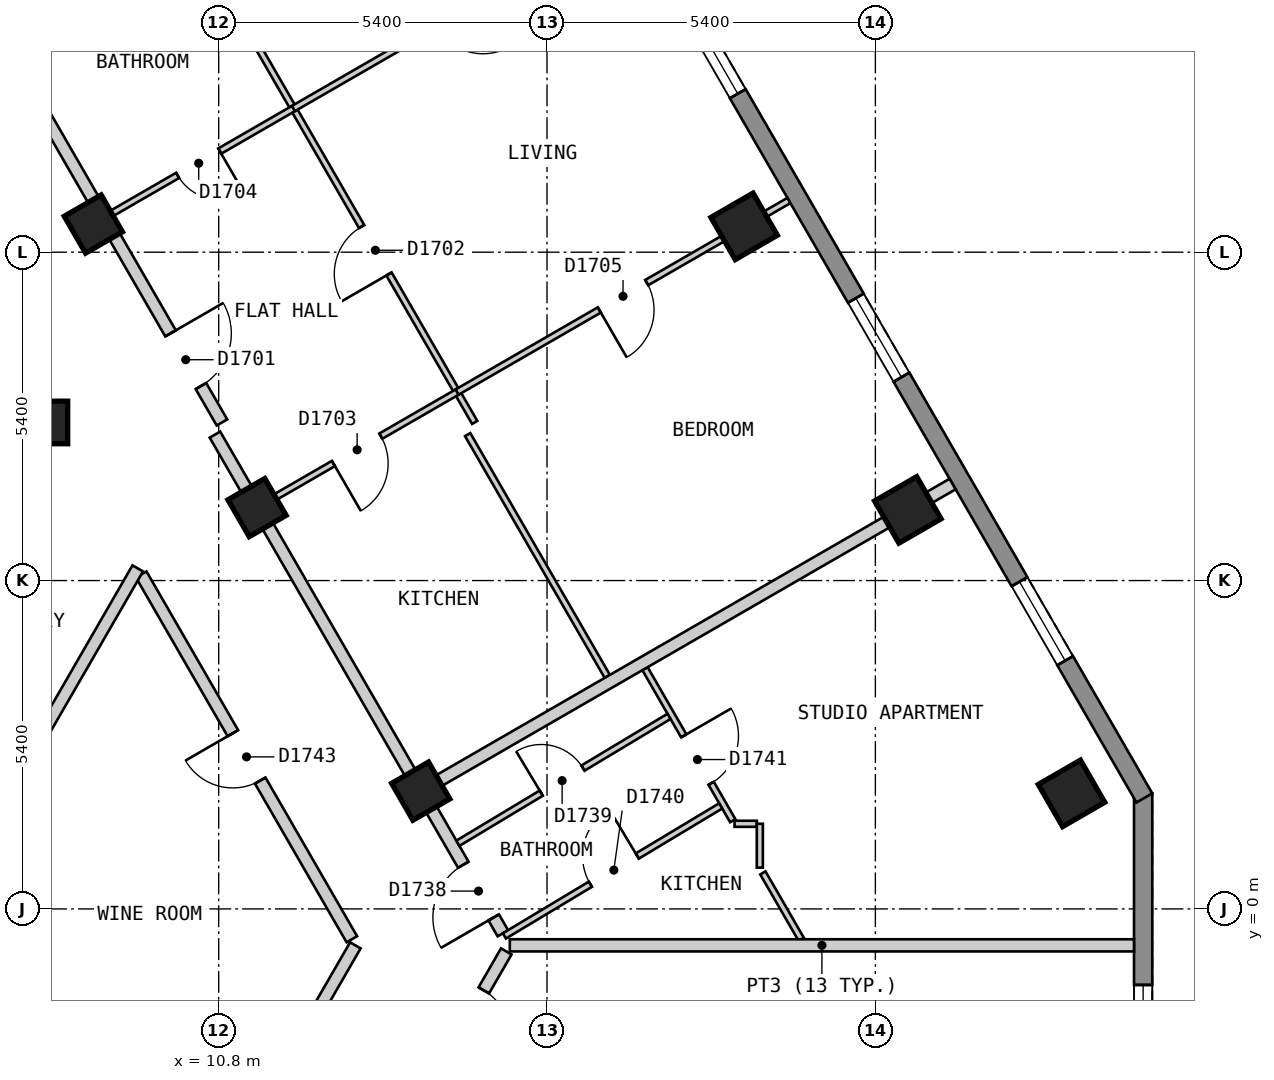
"""IFC4 building model, lengths in metres.
Left out: names, types, materials, properties, quantities, classifications, styles, units other than length and angle.
Written with IfcOpenShell. Run it as: python <this file> out.ifc"""

import sys

from ifc_helpers import new_model, si_unit, direction, frame, frame_2d, origin, origin_2d, place, context, subcontext, project, spatial, polyline, rectangle, outline, extrude, element, fill, save


model = new_model("IFC4")
c1 = context("Model", 3, precision=1e-05, world=origin(), true_north=direction((0.0, 1.0)))
c2 = subcontext(c1, "Body", "Model", "MODEL_VIEW")
j1 = project(units=[si_unit("LENGTHUNIT", "METRE"), si_unit("PLANEANGLEUNIT", "RADIAN")], contexts=[c1])
p1 = place(None, origin())
s1 = spatial("IfcSite", under=j1, at=p1, CompositionType="ELEMENT")
p2 = place(p1, origin())
s2 = spatial("IfcBuilding", under=s1, at=p2, CompositionType="ELEMENT")
p3 = place(p2, frame((0.0, 0.0, 181.2)))
s3 = spatial("IfcBuildingStorey", under=s2, at=p3, CompositionType="ELEMENT", Elevation=181.2)
for number, where, z_axis, x_axis in (
    (1, (24.826, 1.9, 0.0), (0.0, 0.0, 1.0), (-0.5, 0.866, 0.0)),
    (2, (22.134, 6.562, 0.0), (0.0, 0.0, 1.0), (-0.5, 0.866, 0.0)),
    (3, (19.442, 11.225, 0.0), (0.0, 0.0, 1.0), (-0.5, 0.866, 0.0)),
):
    element("IfcColumn", number, at=place(p3, frame(where, z_axis=z_axis, x_axis=x_axis)), inside=s3, PredefinedType="COLUMN", context=c2, shape_type="SweptSolid", body=[
        extrude(rectangle(XDim=0.8, YDim=0.8, at=origin_2d()), origin(), (0.0, 0.0, 1.0), 3.0),
    ])
for number, where, z_axis, x_axis in (
    (4, (14.123, 1.937, 0.0), (0.0, 0.0, 1.0), (-0.5, 0.866, 0.0)),
    (5, (11.431, 6.6, 0.0), (0.0, 0.0, 1.0), (-0.5, 0.866, 0.0)),
    (6, (7.967, 8.0, 0.0), (0.0, 0.0, 1.0), (1.0, 0.0, 0.0)),
    (7, (8.739, 11.263, 0.0), (0.0, 0.0, 1.0), (-0.5, 0.866, 0.0)),
):
    element("IfcColumn", number, at=place(p3, frame(where, z_axis=z_axis, x_axis=x_axis)), inside=s3, PredefinedType="COLUMN", context=c2, shape_type="SweptSolid", body=[
        extrude(rectangle(XDim=0.7, YDim=0.7, at=origin_2d()), origin(), (0.0, 0.0, 1.0), 3.0),
    ])
p4 = place(p3, frame((26.004, -3.1, 0.0), z_axis=(0.0, 0.0, 1.0), x_axis=(0.0, 1.0, 0.0)))
e8 = element("IfcWall", 8, at=p4, inside=s3, PredefinedType="SOLIDWALL", context=c2, shape_type="SweptSolid", body=[
    extrude(outline(polyline([(0.0, -0.15), (5.0, -0.15), (4.92, 0.15), (0.08, 0.15), (0.0, -0.15)])), origin(), (0.0, 0.0, 1.0), 2.7),
])
p5 = place(p4, frame((0.65, 0.0, 0.15)))
e9 = element("IfcOpeningElement", 9, at=p5, cuts=e8, PredefinedType="OPENING", context=c2, shape_type="SweptSolid", body=[
    extrude(rectangle(XDim=1.2, YDim=2.1, at=frame_2d((0.6, 1.05))), frame((0.0, 0.16, 0.0), z_axis=(0.0, -1.0, 0.0), x_axis=(1.0, 0.0, 0.0)), (0.0, 0.0, 1.0), 0.32),
])
p6 = place(p3, frame((26.024, 1.825, 0.0), z_axis=(0.0, 0.0, 1.0), x_axis=(-0.500010537973, 0.866019319597, 0.0)))
e10 = element("IfcWall", 10, at=p6, inside=s3, PredefinedType="SOLIDWALL", context=c2, shape_type="SweptSolid", body=[
    extrude(outline(polyline([(0.0, -0.15), (22.863, -0.15), (22.783, 0.15), (0.08, 0.15), (0.0, -0.15)])), origin(), (0.0, 0.0, 1.0), 2.7),
])
p7 = place(p6, frame((2.606, 0.0, 0.15)))
e11 = element("IfcOpeningElement", 11, at=p7, cuts=e10, PredefinedType="OPENING", context=c2, shape_type="SweptSolid", body=[
    extrude(rectangle(XDim=1.5, YDim=2.1, at=frame_2d((0.75, 1.05))), frame((0.0, 0.16, 0.0), z_axis=(0.0, -1.0, 0.0), x_axis=(1.0, 0.0, 0.0)), (0.0, 0.0, 1.0), 0.32),
])
p8 = place(p6, frame((7.99, 0.0, 0.15)))
e12 = element("IfcOpeningElement", 12, at=p8, cuts=e10, PredefinedType="OPENING", context=c2, shape_type="SweptSolid", body=[
    extrude(rectangle(XDim=1.5, YDim=2.1, at=frame_2d((0.75, 1.05))), frame((0.0, 0.16, 0.0), z_axis=(0.0, -1.0, 0.0), x_axis=(1.0, 0.0, 0.0)), (0.0, 0.0, 1.0), 0.32),
])
p9 = place(p6, frame((13.373, 0.0, 0.15)))
e13 = element("IfcOpeningElement", 13, at=p9, cuts=e10, PredefinedType="OPENING", context=c2, shape_type="SweptSolid", body=[
    extrude(rectangle(XDim=1.5, YDim=2.1, at=frame_2d((0.75, 1.05))), frame((0.0, 0.16, 0.0), z_axis=(0.0, -1.0, 0.0), x_axis=(1.0, 0.0, 0.0)), (0.0, 0.0, 1.0), 0.32),
])
p10 = place(p6, frame((18.758, 0.0, 0.15)))
e14 = element("IfcOpeningElement", 14, at=p10, cuts=e10, PredefinedType="OPENING", context=c2, shape_type="SweptSolid", body=[
    extrude(rectangle(XDim=1.5, YDim=2.1, at=frame_2d((0.75, 1.05))), frame((0.0, 0.16, 0.0), z_axis=(0.0, -1.0, 0.0), x_axis=(1.0, 0.0, 0.0)), (0.0, 0.0, 1.0), 0.32),
])
p11 = place(p3, frame((9.526, 5.5, 0.0), z_axis=(0.0, 0.0, 1.0), x_axis=(0.500062092869, -0.865989551482, 0.0)))
e15 = element("IfcWall", 15, at=p11, inside=s3, PredefinedType="PARTITIONING", context=c2, shape_type="SweptSolid", body=[
    extrude(rectangle(XDim=6.927, YDim=0.2, at=frame_2d((3.464, 0.0))), origin(), (0.0, 0.0, 1.0), 2.7),
])
p12 = place(p11, frame((3.014, 0.0, 0.0)))
e16 = element("IfcOpeningElement", 16, at=p12, cuts=e15, PredefinedType="OPENING", context=c2, shape_type="SweptSolid", body=[
    extrude(rectangle(XDim=0.9, YDim=2.1, at=frame_2d((0.45, 1.05))), frame((0.0, 0.11, 0.0), z_axis=(0.0, -1.0, 0.0), x_axis=(1.0, 0.0, 0.0)), (0.0, 0.0, 1.0), 0.22),
])
p13 = place(p3, frame((10.739, 7.8, 0.0), z_axis=(0.0, 0.0, 1.0), x_axis=(0.500023726918, -0.866011704609, 0.0)))
e17 = element("IfcWall", 17, at=p13, inside=s3, PredefinedType="PARTITIONING", context=c2, shape_type="SweptSolid", body=[
    extrude(rectangle(XDim=9.47, YDim=0.2, at=frame_2d((4.735, 0.0))), origin(), (0.0, 0.0, 1.0), 2.7),
])
p14 = place(p13, frame((8.168, 0.0, 0.0)))
e18 = element("IfcOpeningElement", 18, at=p14, cuts=e17, PredefinedType="OPENING", context=c2, shape_type="SweptSolid", body=[
    extrude(rectangle(XDim=1.0, YDim=2.1, at=frame_2d((0.5, 1.05))), frame((0.0, 0.11, 0.0), z_axis=(0.0, -1.0, 0.0), x_axis=(1.0, 0.0, 0.0)), (0.0, 0.0, 1.0), 0.22),
])
p15 = place(p3, frame((5.485, 17.3, 0.0), z_axis=(0.0, 0.0, 1.0), x_axis=(0.499965832213, -0.866045129667, 0.0)))
e19 = element("IfcWall", 19, at=p15, inside=s3, PredefinedType="PARTITIONING", context=c2, shape_type="SweptSolid", body=[
    extrude(rectangle(XDim=10.739, YDim=0.2, at=frame_2d((5.369, 0.0))), origin(), (0.0, 0.0, 1.0), 2.7),
])
p16 = place(p15, frame((9.047, 0.0, 0.0)))
e20 = element("IfcOpeningElement", 20, at=p16, cuts=e19, PredefinedType="OPENING", context=c2, shape_type="SweptSolid", body=[
    extrude(rectangle(XDim=1.0, YDim=2.1, at=frame_2d((0.5, 1.05))), frame((0.0, 0.11, 0.0), z_axis=(0.0, -1.0, 0.0), x_axis=(1.0, 0.0, 0.0)), (0.0, 0.0, 1.0), 0.22),
])
p17 = place(p3, frame((7.028, 1.373, 0.0), z_axis=(0.0, 0.0, 1.0), x_axis=(0.500065924398, 0.86598733897, 0.0)))
e21 = element("IfcWall", 21, at=p17, inside=s3, PredefinedType="PARTITIONING", context=c2, shape_type="SweptSolid", body=[
    extrude(rectangle(XDim=4.881, YDim=0.2, at=frame_2d((2.44, 0.0))), origin(), (0.0, 0.0, 1.0), 2.7),
])
p18 = place(p3, frame((11.777, -2.8, 0.0), z_axis=(0.0, 0.0, 1.0), x_axis=(0.500085537782, 0.86597601289, 0.0)))
e22 = element("IfcWall", 22, at=p18, inside=s3, PredefinedType="PARTITIONING", context=c2, shape_type="SweptSolid", body=[
    extrude(rectangle(XDim=2.542, YDim=0.2, at=frame_2d((1.271, 0.0))), origin(), (0.0, 0.0, 1.0), 2.7),
])
p19 = place(p3, frame((14.318, -2.8, 0.0), z_axis=(0.0, 0.0, 1.0), x_axis=(0.49964693309, 0.866229151122, 0.0)))
e23 = element("IfcWall", 23, at=p19, inside=s3, PredefinedType="PARTITIONING", context=c2, shape_type="SweptSolid", body=[
    extrude(rectangle(XDim=2.426, YDim=0.2, at=frame_2d((1.213, 0.0))), origin(), (0.0, 0.0, 1.0), 2.7),
])
p20 = place(p19, frame((0.886, 0.0, 0.0)))
e24 = element("IfcOpeningElement", 24, at=p20, cuts=e23, PredefinedType="OPENING", context=c2, shape_type="SweptSolid", body=[
    extrude(rectangle(XDim=0.8, YDim=2.1, at=frame_2d((0.4, 1.05))), frame((0.0, 0.11, 0.0), z_axis=(0.0, -1.0, 0.0), x_axis=(1.0, 0.0, 0.0)), (0.0, 0.0, 1.0), 0.22),
])
p21 = place(p3, frame((14.895, 7.8, 0.0), z_axis=(0.0, 0.0, 1.0), x_axis=(0.500050787847, -0.865996079421, 0.0)))
e25 = element("IfcWall", 25, at=p21, inside=s3, PredefinedType="PARTITIONING", context=c2, shape_type="SweptSolid", body=[
    extrude(rectangle(XDim=4.591, YDim=0.1, at=frame_2d((2.296, 0.0))), origin(), (0.0, 0.0, 1.0), 2.7),
])
p22 = place(p3, frame((9.526, 17.5, 0.0), z_axis=(0.0, 0.0, 1.0), x_axis=(0.500019134094, -0.866014356428, 0.0)))
e26 = element("IfcWall", 26, at=p22, inside=s3, PredefinedType="PARTITIONING", context=c2, shape_type="SweptSolid", body=[
    extrude(rectangle(XDim=10.97, YDim=0.1, at=frame_2d((5.485, 0.0))), origin(), (0.0, 0.0, 1.0), 2.7),
])
p23 = place(p22, frame((7.25, 0.0, 0.0)))
e27 = element("IfcOpeningElement", 27, at=p23, cuts=e26, PredefinedType="OPENING", context=c2, shape_type="SweptSolid", body=[
    extrude(rectangle(XDim=0.9, YDim=2.1, at=frame_2d((0.45, 1.05))), frame((0.0, 0.06, 0.0), z_axis=(0.0, -1.0, 0.0), x_axis=(1.0, 0.0, 0.0)), (0.0, 0.0, 1.0), 0.12),
])
p24 = place(p3, frame((17.811, 3.951, 0.0), z_axis=(0.0, 0.0, 1.0), x_axis=(0.499976149225, -0.866039173598, 0.0)))
e28 = element("IfcWall", 28, at=p24, inside=s3, PredefinedType="PARTITIONING", context=c2, shape_type="SweptSolid", body=[
    extrude(rectangle(XDim=2.888, YDim=0.1, at=frame_2d((1.444, 0.0))), origin(), (0.0, 0.0, 1.0), 2.7),
])
p25 = place(p24, frame((1.276, 0.0, 0.0)))
e29 = element("IfcOpeningElement", 29, at=p25, cuts=e28, PredefinedType="OPENING", context=c2, shape_type="SweptSolid", body=[
    extrude(rectangle(XDim=0.9, YDim=2.1, at=frame_2d((0.45, 1.05))), frame((0.0, 0.06, 0.0), z_axis=(0.0, -1.0, 0.0), x_axis=(1.0, 0.0, 0.0)), (0.0, 0.0, 1.0), 0.12),
])
p26 = place(p3, frame((19.75, 0.592, 0.0), z_axis=(0.0, 0.0, 1.0), x_axis=(0.499974077718, -0.866040369504, 0.0)))
e30 = element("IfcWall", 30, at=p26, inside=s3, PredefinedType="PARTITIONING", context=c2, shape_type="SweptSolid", body=[
    extrude(rectangle(XDim=1.26, YDim=0.1, at=frame_2d((0.63, 0.0))), origin(), (0.0, 0.0, 1.0), 2.7),
])
p27 = place(p3, frame((19.284, 1.4, 0.0), z_axis=(0.0, 0.0, 1.0), x_axis=(1.0, 0.0, 0.0)))
e31 = element("IfcWall", 31, at=p27, inside=s3, PredefinedType="PARTITIONING", context=c2, shape_type="SweptSolid", body=[
    extrude(rectangle(XDim=0.366, YDim=0.1, at=frame_2d((0.183, 0.0))), origin(), (0.0, 0.0, 1.0), 2.7),
])
p28 = place(p3, frame((19.7, 0.679, 0.0), z_axis=(0.0, 0.0, 1.0), x_axis=(0.0, 1.0, 0.0)))
e32 = element("IfcWall", 32, at=p28, inside=s3, PredefinedType="PARTITIONING", context=c2, shape_type="SweptSolid", body=[
    extrude(rectangle(XDim=0.721, YDim=0.1, at=frame_2d((0.36, 0.0))), origin(), (0.0, 0.0, 1.0), 2.7),
])
p29 = place(p3, frame((11.518, 6.65, 0.0), z_axis=(0.0, 0.0, 1.0), x_axis=(0.865984470368, 0.500070892056, 0.0)))
e33 = element("IfcWall", 33, at=p29, inside=s3, PredefinedType="PARTITIONING", context=c2, shape_type="SweptSolid", body=[
    extrude(rectangle(XDim=3.7, YDim=0.1, at=frame_2d((1.85, 0.0))), origin(), (0.0, 0.0, 1.0), 2.7),
])
p30 = place(p29, frame((1.35, 0.0, 0.0)))
e34 = element("IfcOpeningElement", 34, at=p30, cuts=e33, PredefinedType="OPENING", context=c2, shape_type="SweptSolid", body=[
    extrude(rectangle(XDim=0.9, YDim=2.1, at=frame_2d((0.45, 1.05))), frame((0.0, 0.06, 0.0), z_axis=(0.0, -1.0, 0.0), x_axis=(1.0, 0.0, 0.0)), (0.0, 0.0, 1.0), 0.12),
])
p31 = place(p3, frame((8.999, 11.413, 0.0), z_axis=(0.0, 0.0, 1.0), x_axis=(0.866019471182, 0.500010275428, 0.0)))
e35 = element("IfcWall", 35, at=p31, inside=s3, PredefinedType="PARTITIONING", context=c2, shape_type="SweptSolid", body=[
    extrude(rectangle(XDim=3.5, YDim=0.1, at=frame_2d((1.75, 0.0))), origin(), (0.0, 0.0, 1.0), 2.7),
])
p32 = place(p31, frame((1.3, 0.0, 0.0)))
e36 = element("IfcOpeningElement", 36, at=p32, cuts=e35, PredefinedType="OPENING", context=c2, shape_type="SweptSolid", body=[
    extrude(rectangle(XDim=0.8, YDim=2.1, at=frame_2d((0.4, 1.05))), frame((0.0, 0.06, 0.0), z_axis=(0.0, -1.0, 0.0), x_axis=(1.0, 0.0, 0.0)), (0.0, 0.0, 1.0), 0.12),
])
p33 = place(p3, frame((14.734, 1.08, 0.0), z_axis=(0.0, 0.0, 1.0), x_axis=(0.857205608004, 0.514974315482, 0.0)))
e37 = element("IfcWall", 37, at=p33, inside=s3, PredefinedType="PARTITIONING", context=c2, shape_type="SweptSolid", body=[
    extrude(rectangle(XDim=4.051, YDim=0.1, at=frame_2d((2.025, 0.0))), origin(), (0.0, 0.0, 1.0), 2.7),
])
p34 = place(p33, frame((1.6, 0.0, 0.0)))
e38 = element("IfcOpeningElement", 38, at=p34, cuts=e37, PredefinedType="OPENING", context=c2, shape_type="SweptSolid", body=[
    extrude(rectangle(XDim=0.8, YDim=2.1, at=frame_2d((0.4, 1.05))), frame((0.0, 0.06, 0.0), z_axis=(0.0, -1.0, 0.0), x_axis=(1.0, 0.0, 0.0)), (0.0, 0.0, 1.0), 0.12),
])
p35 = place(p3, frame((15.499, -0.444, 0.0), z_axis=(0.0, 0.0, 1.0), x_axis=(0.857061798163, 0.515213619899, 0.0)))
e39 = element("IfcWall", 39, at=p35, inside=s3, PredefinedType="PARTITIONING", context=c2, shape_type="SweptSolid", body=[
    extrude(rectangle(XDim=4.15, YDim=0.1, at=frame_2d((2.075, 0.0))), origin(), (0.0, 0.0, 1.0), 2.7),
])
p36 = place(p35, frame((1.65, 0.0, 0.0)))
e40 = element("IfcOpeningElement", 40, at=p36, cuts=e39, PredefinedType="OPENING", context=c2, shape_type="SweptSolid", body=[
    extrude(rectangle(XDim=0.9, YDim=2.1, at=frame_2d((0.45, 1.05))), frame((0.0, 0.06, 0.0), z_axis=(0.0, -1.0, 0.0), x_axis=(1.0, 0.0, 0.0)), (0.0, 0.0, 1.0), 0.12),
])
p37 = place(p3, frame((15.588, -0.599, 0.0), z_axis=(0.0, 0.0, 1.0), x_axis=(1.0, 0.0, 0.0)))
e41 = element("IfcWall", 41, at=p37, inside=s3, PredefinedType="PARTITIONING", context=c2, shape_type="SweptSolid", body=[
    extrude(rectangle(XDim=10.266, YDim=0.2, at=frame_2d((5.133, 0.0))), origin(), (0.0, 0.0, 1.0), 2.7),
])
p38 = place(p3, frame((7.448, 14.1, 0.0), z_axis=(0.0, 0.0, 1.0), x_axis=(0.499961462843, 0.866047652079, 0.0)))
e42 = element("IfcWall", 42, at=p38, inside=s3, PredefinedType="PARTITIONING", context=c2, shape_type="SweptSolid", body=[
    extrude(rectangle(XDim=4.362, YDim=0.2, at=frame_2d((2.181, 0.0))), origin(), (0.0, 0.0, 1.0), 2.7),
])
p39 = place(p3, frame((14.21, 1.987, 0.0), z_axis=(0.0, 0.0, 1.0), x_axis=(0.866022959057, 0.500004234368, 0.0)))
e43 = element("IfcWall", 43, at=p39, inside=s3, PredefinedType="PARTITIONING", context=c2, shape_type="SweptSolid", body=[
    extrude(rectangle(XDim=10.0, YDim=0.2, at=frame_2d((5.0, 0.0))), origin(), (0.0, 0.0, 1.0), 2.7),
])
p40 = place(p3, frame((14.722, 8.5, 0.0), z_axis=(0.0, 0.0, 1.0), x_axis=(0.866035871367, 0.499981869177, 0.0)))
e44 = element("IfcWall", 44, at=p40, inside=s3, PredefinedType="PARTITIONING", context=c2, shape_type="SweptSolid", body=[
    extrude(rectangle(XDim=6.3, YDim=0.1, at=frame_2d((3.15, 0.0))), origin(), (0.0, 0.0, 1.0), 2.7),
])
p41 = place(p40, frame((2.7, 0.0, 0.0)))
e45 = element("IfcOpeningElement", 45, at=p41, cuts=e44, PredefinedType="OPENING", context=c2, shape_type="SweptSolid", body=[
    extrude(rectangle(XDim=0.9, YDim=2.1, at=frame_2d((0.45, 1.05))), frame((0.0, 0.06, 0.0), z_axis=(0.0, -1.0, 0.0), x_axis=(1.0, 0.0, 0.0)), (0.0, 0.0, 1.0), 0.12),
])
p42 = place(p3, frame((12.03, 13.163, 0.0), z_axis=(0.0, 0.0, 1.0), x_axis=(0.866035871367, 0.499981869177, 0.0)))
e46 = element("IfcWall", 46, at=p42, inside=s3, PredefinedType="PARTITIONING", context=c2, shape_type="SweptSolid", body=[
    extrude(rectangle(XDim=6.3, YDim=0.1, at=frame_2d((3.15, 0.0))), origin(), (0.0, 0.0, 1.0), 2.7),
])
p43 = place(p42, frame((2.7, 0.0, 0.0)))
e47 = element("IfcOpeningElement", 47, at=p43, cuts=e46, PredefinedType="OPENING", context=c2, shape_type="SweptSolid", body=[
    extrude(rectangle(XDim=0.9, YDim=2.1, at=frame_2d((0.45, 1.05))), frame((0.0, 0.06, 0.0), z_axis=(0.0, -1.0, 0.0), x_axis=(1.0, 0.0, 0.0)), (0.0, 0.0, 1.0), 0.12),
])
p44 = place(p5, origin())
e48 = element("IfcWindow", 48, at=p44, inside=s3, PartitioningType="SINGLE_PANEL", PredefinedType="WINDOW", context=c2, shape_type="SweptSolid", body=[
    extrude(rectangle(XDim=1.2, YDim=2.1, at=frame_2d((0.6, 1.05))), frame((0.0, 0.03, 0.0), z_axis=(0.0, -1.0, 0.0), x_axis=(1.0, 0.0, 0.0)), (0.0, 0.0, 1.0), 0.06),
])
fill(e9, e48)
p45 = place(p7, origin())
e49 = element("IfcWindow", 49, at=p45, inside=s3, PartitioningType="SINGLE_PANEL", PredefinedType="WINDOW", context=c2, shape_type="SweptSolid", body=[
    extrude(rectangle(XDim=1.5, YDim=2.1, at=frame_2d((0.75, 1.05))), frame((0.0, 0.03, 0.0), z_axis=(0.0, -1.0, 0.0), x_axis=(1.0, 0.0, 0.0)), (0.0, 0.0, 1.0), 0.06),
])
fill(e11, e49)
p46 = place(p8, origin())
e50 = element("IfcWindow", 50, at=p46, inside=s3, PartitioningType="SINGLE_PANEL", PredefinedType="WINDOW", context=c2, shape_type="SweptSolid", body=[
    extrude(rectangle(XDim=1.5, YDim=2.1, at=frame_2d((0.75, 1.05))), frame((0.0, 0.03, 0.0), z_axis=(0.0, -1.0, 0.0), x_axis=(1.0, 0.0, 0.0)), (0.0, 0.0, 1.0), 0.06),
])
fill(e12, e50)
p47 = place(p9, origin())
e51 = element("IfcWindow", 51, at=p47, inside=s3, PartitioningType="SINGLE_PANEL", PredefinedType="WINDOW", context=c2, shape_type="SweptSolid", body=[
    extrude(rectangle(XDim=1.5, YDim=2.1, at=frame_2d((0.75, 1.05))), frame((0.0, 0.03, 0.0), z_axis=(0.0, -1.0, 0.0), x_axis=(1.0, 0.0, 0.0)), (0.0, 0.0, 1.0), 0.06),
])
fill(e13, e51)
p48 = place(p16, origin())
e52 = element("IfcDoor", 52, at=p48, inside=s3, OperationType="SINGLE_SWING_LEFT", PredefinedType="DOOR", context=c2, shape_type="SweptSolid", body=[
    extrude(rectangle(XDim=1.0, YDim=2.1, at=frame_2d((0.5, 1.05))), frame((0.0, 0.025, 0.0), z_axis=(0.0, -1.0, 0.0), x_axis=(1.0, 0.0, 0.0)), (0.0, 0.0, 1.0), 0.05),
])
fill(e20, e52)
p49 = place(p23, origin())
e53 = element("IfcDoor", 53, at=p49, inside=s3, OperationType="SINGLE_SWING_RIGHT", PredefinedType="DOOR", context=c2, shape_type="SweptSolid", body=[
    extrude(rectangle(XDim=0.9, YDim=2.1, at=frame_2d((0.45, 1.05))), frame((0.0, 0.025, 0.0), z_axis=(0.0, -1.0, 0.0), x_axis=(1.0, 0.0, 0.0)), (0.0, 0.0, 1.0), 0.05),
])
fill(e27, e53)
p50 = place(p30, origin())
e54 = element("IfcDoor", 54, at=p50, inside=s3, OperationType="SINGLE_SWING_LEFT", PredefinedType="DOOR", context=c2, shape_type="SweptSolid", body=[
    extrude(rectangle(XDim=0.9, YDim=2.1, at=frame_2d((0.45, 1.05))), frame((0.0, 0.025, 0.0), z_axis=(0.0, -1.0, 0.0), x_axis=(1.0, 0.0, 0.0)), (0.0, 0.0, 1.0), 0.05),
])
fill(e34, e54)
p51 = place(p32, origin())
e55 = element("IfcDoor", 55, at=p51, inside=s3, OperationType="SINGLE_SWING_RIGHT", PredefinedType="DOOR", context=c2, shape_type="SweptSolid", body=[
    extrude(rectangle(XDim=0.8, YDim=2.1, at=frame_2d((0.4, 1.05))), frame((0.0, 0.025, 0.0), z_axis=(0.0, -1.0, 0.0), x_axis=(1.0, 0.0, 0.0)), (0.0, 0.0, 1.0), 0.05),
])
fill(e36, e55)
p52 = place(p41, origin())
e56 = element("IfcDoor", 56, at=p52, inside=s3, OperationType="SINGLE_SWING_LEFT", PredefinedType="DOOR", context=c2, shape_type="SweptSolid", body=[
    extrude(rectangle(XDim=0.9, YDim=2.1, at=frame_2d((0.45, 1.05))), frame((0.0, 0.025, 0.0), z_axis=(0.0, -1.0, 0.0), x_axis=(1.0, 0.0, 0.0)), (0.0, 0.0, 1.0), 0.05),
])
fill(e45, e56)
p53 = place(p20, origin())
e57 = element("IfcDoor", 57, at=p53, inside=s3, OperationType="SINGLE_SWING_LEFT", PredefinedType="DOOR", context=c2, shape_type="SweptSolid", body=[
    extrude(rectangle(XDim=0.8, YDim=2.1, at=frame_2d((0.4, 1.05))), frame((0.0, 0.025, 0.0), z_axis=(0.0, -1.0, 0.0), x_axis=(1.0, 0.0, 0.0)), (0.0, 0.0, 1.0), 0.05),
])
fill(e24, e57)
p54 = place(p14, origin())
e58 = element("IfcDoor", 58, at=p54, inside=s3, OperationType="SINGLE_SWING_RIGHT", PredefinedType="DOOR", context=c2, shape_type="SweptSolid", body=[
    extrude(rectangle(XDim=1.0, YDim=2.1, at=frame_2d((0.5, 1.05))), frame((0.0, 0.025, 0.0), z_axis=(0.0, -1.0, 0.0), x_axis=(1.0, 0.0, 0.0)), (0.0, 0.0, 1.0), 0.05),
])
fill(e18, e58)
p55 = place(p34, origin())
e59 = element("IfcDoor", 59, at=p55, inside=s3, OperationType="SINGLE_SWING_LEFT", PredefinedType="DOOR", context=c2, shape_type="SweptSolid", body=[
    extrude(rectangle(XDim=0.8, YDim=2.1, at=frame_2d((0.4, 1.05))), frame((0.0, 0.025, 0.0), z_axis=(0.0, -1.0, 0.0), x_axis=(1.0, 0.0, 0.0)), (0.0, 0.0, 1.0), 0.05),
])
fill(e38, e59)
p56 = place(p36, origin())
e60 = element("IfcDoor", 60, at=p56, inside=s3, OperationType="SINGLE_SWING_RIGHT", PredefinedType="DOOR", context=c2, shape_type="SweptSolid", body=[
    extrude(rectangle(XDim=0.9, YDim=2.1, at=frame_2d((0.45, 1.05))), frame((0.0, 0.025, 0.0), z_axis=(0.0, -1.0, 0.0), x_axis=(1.0, 0.0, 0.0)), (0.0, 0.0, 1.0), 0.05),
])
fill(e40, e60)
p57 = place(p25, origin())
e61 = element("IfcDoor", 61, at=p57, inside=s3, OperationType="SINGLE_SWING_LEFT", PredefinedType="DOOR", context=c2, shape_type="SweptSolid", body=[
    extrude(rectangle(XDim=0.9, YDim=2.1, at=frame_2d((0.45, 1.05))), frame((0.0, 0.025, 0.0), z_axis=(0.0, -1.0, 0.0), x_axis=(1.0, 0.0, 0.0)), (0.0, 0.0, 1.0), 0.05),
])
fill(e29, e61)
p58 = place(p12, origin())
e62 = element("IfcDoor", 62, at=p58, inside=s3, OperationType="SINGLE_SWING_LEFT", PredefinedType="DOOR", context=c2, shape_type="SweptSolid", body=[
    extrude(rectangle(XDim=0.9, YDim=2.1, at=frame_2d((0.45, 1.05))), frame((0.0, 0.025, 0.0), z_axis=(0.0, -1.0, 0.0), x_axis=(1.0, 0.0, 0.0)), (0.0, 0.0, 1.0), 0.05),
])
fill(e16, e62)
save(model, sys.argv[1])
